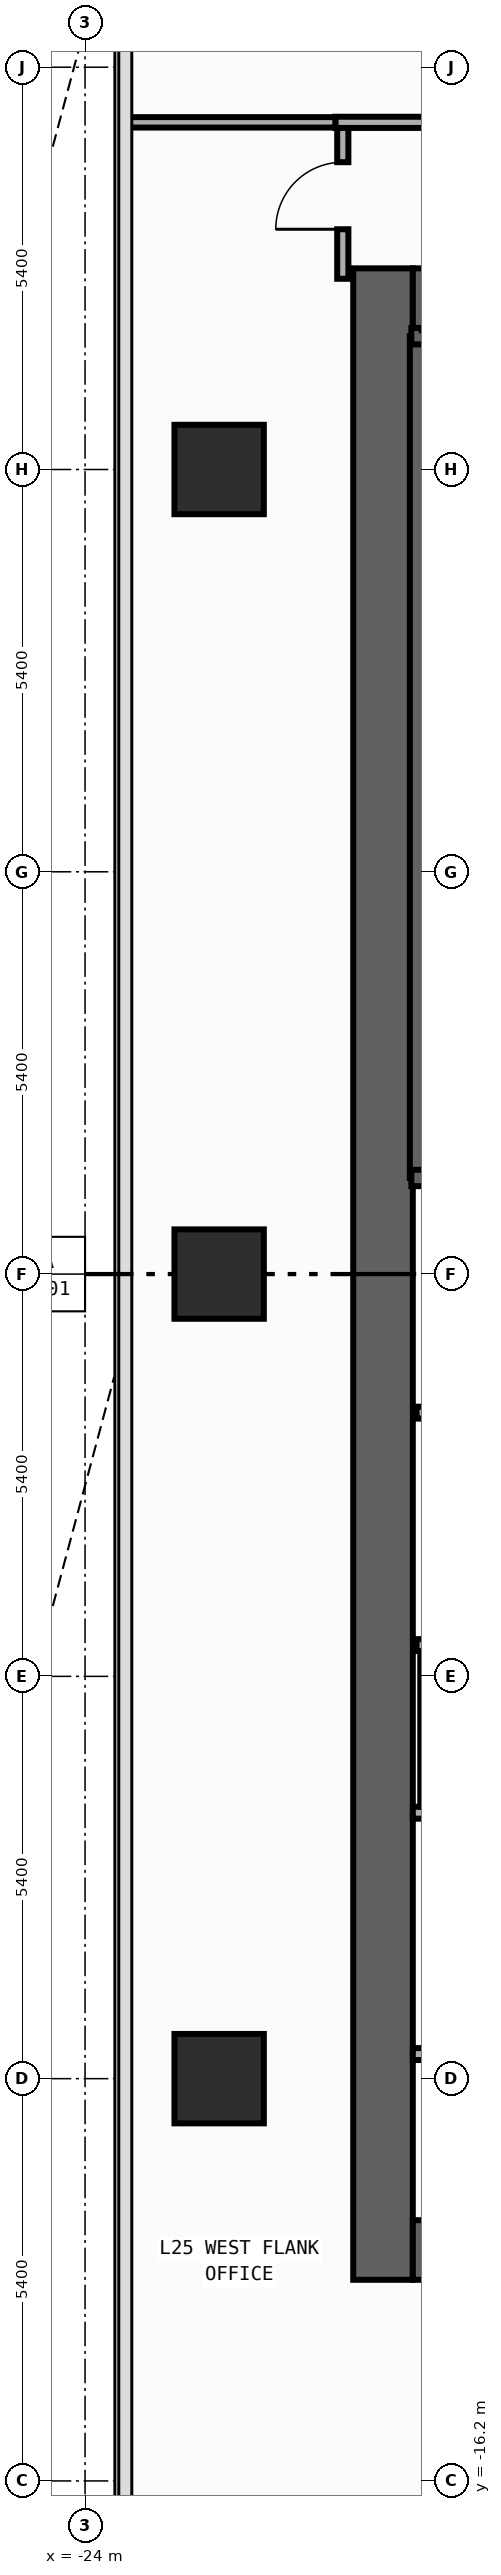
"""IFC4 building model, lengths in metres.
Left out: names, types, materials, properties, quantities, classifications, styles, units other than length and angle.
Written with IfcOpenShell. Run it as: python <this file> out.ifc"""

import sys

from ifc_helpers import new_model, si_unit, direction, frame, frame_2d, origin, origin_2d, place, context, subcontext, project, spatial, rectangle, extrude, element, fill, save


model = new_model("IFC4")
c1 = context("Model", 3, precision=1e-05, world=origin(), true_north=direction((0.0, 1.0)))
c2 = subcontext(c1, "Body", "Model", "MODEL_VIEW")
j1 = project(units=[si_unit("LENGTHUNIT", "METRE"), si_unit("PLANEANGLEUNIT", "RADIAN")], contexts=[c1])
p1 = place(None, origin())
s1 = spatial("IfcSite", under=j1, at=p1, CompositionType="ELEMENT")
p2 = place(p1, origin())
s2 = spatial("IfcBuilding", under=s1, at=p2, CompositionType="ELEMENT")
p3 = place(p2, frame((0.0, 0.0, 110.0)))
s3 = spatial("IfcBuildingStorey", under=s2, at=p3, CompositionType="ELEMENT", Elevation=110.0)
p4 = place(p3, frame((-20.0, -13.5, 0.0), z_axis=(0.0, 0.0, 1.0), x_axis=(0.0, 1.0, 0.0)))
e1 = element("IfcWall", 1, at=p4, inside=s3, PredefinedType="SHEAR", context=c2, shape_type="SweptSolid", body=[
    extrude(rectangle(XDim=27.0, YDim=0.8, at=frame_2d((13.5, 0.0))), origin(), (0.0, 0.0, 1.0), 3.94),
])
for number, where, z_axis, x_axis in (
    (2, (-19.6, -13.1, 0.0), (0.0, 0.0, 1.0), (1.0, 0.0, 0.0)),
    (3, (-19.6, 13.1, 0.0), (0.0, 0.0, 1.0), (1.0, 0.0, 0.0)),
):
    element("IfcWall", number, at=place(p3, frame(where, z_axis=z_axis, x_axis=x_axis)), inside=s3, PredefinedType="SHEAR", context=c2, shape_type="SweptSolid", body=[
        extrude(rectangle(XDim=6.8, YDim=0.8, at=frame_2d((3.4, 0.0))), origin(), (0.0, 0.0, 1.0), 3.94),
    ])
p5 = place(p3, frame((-19.53, 1.29, 0.0), z_axis=(0.0, 0.0, 1.0), x_axis=(0.0, 1.0, 0.0)))
e4 = element("IfcWall", 4, at=p5, inside=s3, PredefinedType="SHEAR", context=c2, shape_type="SweptSolid", body=[
    extrude(rectangle(XDim=11.3, YDim=0.22, at=frame_2d((5.65, 0.0))), origin(), (0.0, 0.0, 1.0), 3.94),
])
p6 = place(p3, frame((-19.62, 12.59, 0.0), z_axis=(0.0, 0.0, 1.0), x_axis=(1.0, 0.0, 0.0)))
e5 = element("IfcWall", 5, at=p6, inside=s3, PredefinedType="SHEAR", context=c2, shape_type="SweptSolid", body=[
    extrude(rectangle(XDim=3.915, YDim=0.22, at=frame_2d((1.958, 0.0))), origin(), (0.0, 0.0, 1.0), 3.94),
])
p7 = place(p3, frame((-19.62, 1.29, 0.0), z_axis=(0.0, 0.0, 1.0), x_axis=(1.0, 0.0, 0.0)))
e6 = element("IfcWall", 6, at=p7, inside=s3, PredefinedType="SHEAR", context=c2, shape_type="SweptSolid", body=[
    extrude(rectangle(XDim=3.915, YDim=0.22, at=frame_2d((1.958, 0.0))), origin(), (0.0, 0.0, 1.0), 3.94),
])
p8 = place(p7, frame((1.08, 0.0, 0.0)))
e7 = element("IfcOpeningElement", 7, at=p8, cuts=e6, PredefinedType="OPENING", context=c2, shape_type="SweptSolid", body=[
    extrude(rectangle(XDim=1.1, YDim=2.2, at=frame_2d((0.55, 1.1))), frame((0.0, 0.12, 0.0), z_axis=(0.0, -1.0, 0.0), x_axis=(1.0, 0.0, 0.0)), (0.0, 0.0, 1.0), 0.24),
])
for number, where, z_axis, x_axis in (
    (8, (-22.2, -10.8, 0.0), (0.0, 0.0, 1.0), (1.0, 0.0, 0.0)),
    (9, (-22.2, 0.0, 0.0), (0.0, 0.0, 1.0), (1.0, 0.0, 0.0)),
    (10, (-22.2, 10.8, 0.0), (0.0, 0.0, 1.0), (1.0, 0.0, 0.0)),
):
    element("IfcColumn", number, at=place(p3, frame(where, z_axis=z_axis, x_axis=x_axis)), inside=s3, PredefinedType="COLUMN", context=c2, shape_type="SweptSolid", body=[
        extrude(rectangle(XDim=1.2, YDim=1.2, at=origin_2d()), origin(), (0.0, 0.0, 1.0), 4.2),
    ])
p9 = place(p3, frame((-19.55, -1.86, 0.0), z_axis=(0.0, 0.0, 1.0), x_axis=(1.0, 0.0, 0.0)))
e11 = element("IfcWall", 11, at=p9, inside=s3, PredefinedType="STANDARD", context=c2, shape_type="SweptSolid", body=[
    extrude(rectangle(XDim=3.8, YDim=0.16, at=frame_2d((1.9, 0.0))), origin(), (0.0, 0.0, 1.0), 3.94),
])
p10 = place(p9, frame((1.18, 0.0, 0.0)))
e12 = element("IfcOpeningElement", 12, at=p10, cuts=e11, PredefinedType="OPENING", context=c2, shape_type="SweptSolid", body=[
    extrude(rectangle(XDim=1.15, YDim=2.2, at=frame_2d((0.575, 1.1))), frame((0.0, 0.09, 0.0), z_axis=(0.0, -1.0, 0.0), x_axis=(1.0, 0.0, 0.0)), (0.0, 0.0, 1.0), 0.18),
])
p11 = place(p3, frame((-19.55, -4.98, 0.0), z_axis=(0.0, 0.0, 1.0), x_axis=(1.0, 0.0, 0.0)))
e13 = element("IfcWall", 13, at=p11, inside=s3, PredefinedType="STANDARD", context=c2, shape_type="SweptSolid", body=[
    extrude(rectangle(XDim=3.8, YDim=0.16, at=frame_2d((1.9, 0.0))), origin(), (0.0, 0.0, 1.0), 3.94),
])
for number, where, z_axis, x_axis in (
    (14, (-19.6, -10.47, 0.0), (0.0, 0.0, 1.0), (1.0, 0.0, 0.0)),
    (15, (-19.6, -7.23, 0.0), (0.0, 0.0, 1.0), (1.0, 0.0, 0.0)),
):
    element("IfcWall", number, at=place(p3, frame(where, z_axis=z_axis, x_axis=x_axis)), inside=s3, PredefinedType="PARTITIONING", context=c2, shape_type="SweptSolid", body=[
        extrude(rectangle(XDim=2.29, YDim=0.16, at=frame_2d((1.145, 0.0))), origin(), (0.0, 0.0, 1.0), 3.94),
    ])
p12 = place(p3, frame((-20.54, 13.36, 0.0), z_axis=(0.0, 0.0, 1.0), x_axis=(0.0, 1.0, 0.0)))
e16 = element("IfcWall", 16, at=p12, inside=s3, PredefinedType="PARTITIONING", context=c2, shape_type="SweptSolid", body=[
    extrude(rectangle(XDim=2.025, YDim=0.15, at=frame_2d((1.012, 0.0))), origin(), (0.0, 0.0, 1.0), 3.94),
])
p13 = place(p12, frame((0.665, 0.0, 0.0)))
e17 = element("IfcOpeningElement", 17, at=p13, cuts=e16, PredefinedType="OPENING", context=c2, shape_type="SweptSolid", body=[
    extrude(rectangle(XDim=0.9, YDim=2.15, at=frame_2d((0.45, 1.075))), frame((0.0, 0.085, 0.0), z_axis=(0.0, -1.0, 0.0), x_axis=(1.0, 0.0, 0.0)), (0.0, 0.0, 1.0), 0.17),
])
p14 = place(p3, frame((-20.64, 15.46, 0.0), z_axis=(0.0, 0.0, 1.0), x_axis=(1.0, 0.0, 0.0)))
e18 = element("IfcWall", 18, at=p14, inside=s3, PredefinedType="PARTITIONING", context=c2, shape_type="SweptSolid", body=[
    extrude(rectangle(XDim=8.65, YDim=0.15, at=frame_2d((4.325, 0.0))), origin(), (0.0, 0.0, 1.0), 3.94),
])
p15 = place(p14, frame((2.871, 0.0, 0.0)))
e19 = element("IfcOpeningElement", 19, at=p15, cuts=e18, PredefinedType="OPENING", context=c2, shape_type="SweptSolid", body=[
    extrude(rectangle(XDim=0.9, YDim=2.15, at=frame_2d((0.45, 1.075))), frame((0.0, 0.085, 0.0), z_axis=(0.0, -1.0, 0.0), x_axis=(1.0, 0.0, 0.0)), (0.0, 0.0, 1.0), 0.17),
])
p16 = place(p3, frame((-23.455, 15.46, 0.0), z_axis=(0.0, 0.0, 1.0), x_axis=(1.0, 0.0, 0.0)))
e20 = element("IfcWall", 20, at=p16, inside=s3, PredefinedType="PARTITIONING", context=c2, shape_type="SweptSolid", body=[
    extrude(rectangle(XDim=2.815, YDim=0.14, at=frame_2d((1.408, 0.0))), origin(), (0.0, 0.0, 1.0), 3.94),
])
p17 = place(p3, frame((-19.45, -7.15, 0.0), z_axis=(0.0, 0.0, 1.0), x_axis=(0.0, 1.0, 0.0)))
e21 = element("IfcWall", 21, at=p17, inside=s3, PredefinedType="PARTITIONING", context=c2, shape_type="SweptSolid", body=[
    extrude(rectangle(XDim=2.09, YDim=0.1, at=frame_2d((1.045, 0.0))), origin(), (0.0, 0.0, 1.0), 3.94),
])
p18 = place(p13, origin())
e22 = element("IfcDoor", 22, at=p18, inside=s3, OperationType="SINGLE_SWING_LEFT", PredefinedType="DOOR", context=c2, shape_type="SweptSolid", body=[
    extrude(rectangle(XDim=0.9, YDim=2.15, at=frame_2d((0.45, 1.075))), frame((0.0, 0.025, 0.0), z_axis=(0.0, -1.0, 0.0), x_axis=(1.0, 0.0, 0.0)), (0.0, 0.0, 1.0), 0.05),
])
fill(e17, e22)
save(model, sys.argv[1])
